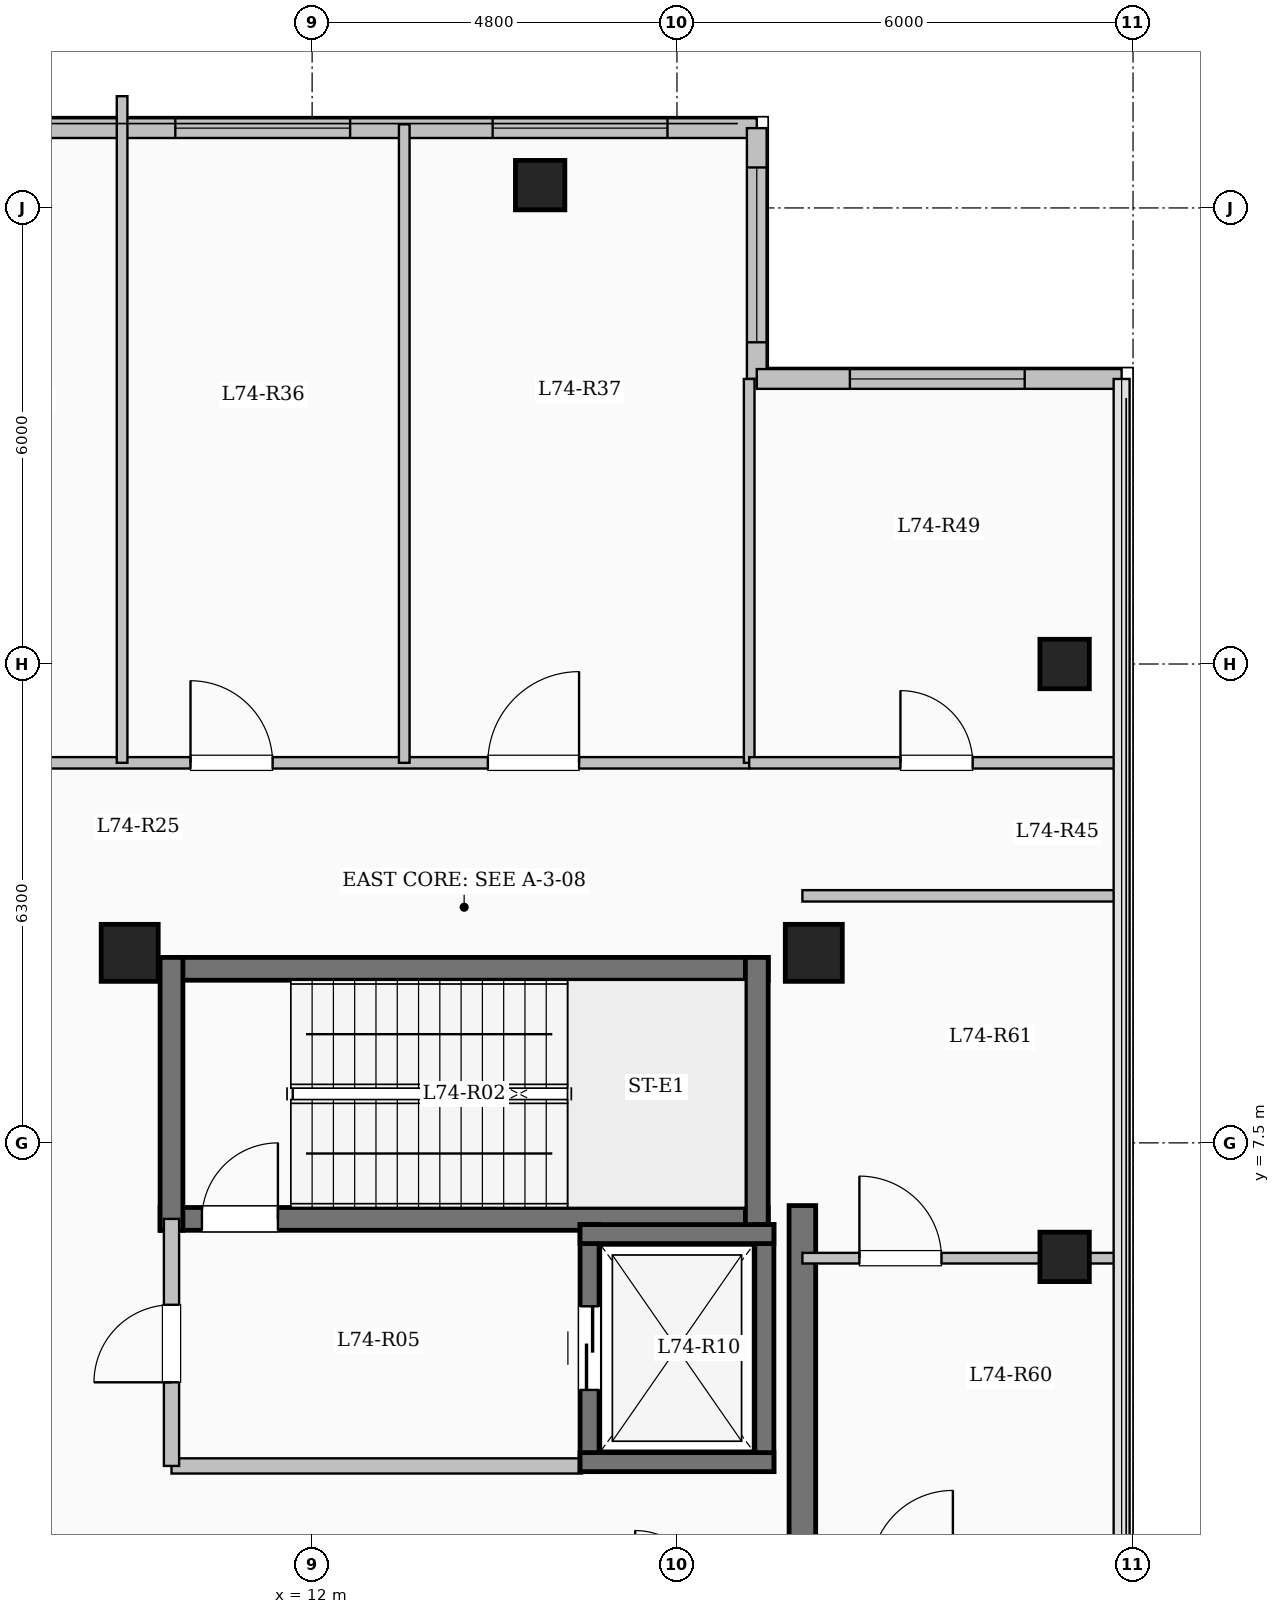
"""IFC4 building model, lengths in metres.
Left out: names, types, materials, properties, quantities, classifications, styles, units other than length and angle.
Written with IfcOpenShell. Run it as: python <this file> out.ifc"""

import sys

from ifc_helpers import new_model, si_unit, direction, frame, frame_2d, origin, origin_2d, place, context, subcontext, project, spatial, rectangle, extrude, element, fill, save


model = new_model("IFC4")
c1 = context("Model", 3, precision=1e-05, world=origin(), true_north=direction((0.0, 1.0)))
c2 = subcontext(c1, "Body", "Model", "MODEL_VIEW")
j1 = project(units=[si_unit("LENGTHUNIT", "METRE"), si_unit("PLANEANGLEUNIT", "RADIAN")], contexts=[c1])
p1 = place(None, origin())
s1 = spatial("IfcSite", under=j1, at=p1, CompositionType="ELEMENT")
p2 = place(p1, origin())
s2 = spatial("IfcBuilding", under=s1, at=p2, CompositionType="ELEMENT")
p3 = place(p2, frame((0.0, 0.0, 271.65)))
s3 = spatial("IfcBuildingStorey", under=s2, at=p3, CompositionType="ELEMENT", Elevation=271.65)
for number, where, z_axis, x_axis in (
    (1, (9.6, 10.0, 0.0), (0.0, 0.0, 1.0), (1.0, 0.0, 0.0)),
    (2, (18.6, 10.0, 0.0), (0.0, 0.0, 1.0), (1.0, 0.0, 0.0)),
):
    element("IfcColumn", number, at=place(p3, frame(where, z_axis=z_axis, x_axis=x_axis)), inside=s3, PredefinedType="COLUMN", context=c2, shape_type="SweptSolid", body=[
        extrude(rectangle(XDim=0.75, YDim=0.75, at=origin_2d()), origin(), (0.0, 0.0, 1.0), 4.65),
    ])
for number, where, z_axis, x_axis in (
    (3, (15.0, 20.1, 0.0), (0.0, 0.0, 1.0), (1.0, 0.0, 0.0)),
    (4, (21.9, 6.0, 0.0), (0.0, 0.0, 1.0), (1.0, 0.0, 0.0)),
    (5, (21.9, 13.8, 0.0), (0.0, 0.0, 1.0), (1.0, 0.0, 0.0)),
):
    element("IfcColumn", number, at=place(p3, frame(where, z_axis=z_axis, x_axis=x_axis)), inside=s3, PredefinedType="COLUMN", context=c2, shape_type="SweptSolid", body=[
        extrude(rectangle(XDim=0.65, YDim=0.65, at=origin_2d()), origin(), (0.0, 0.0, 1.0), 4.65),
    ])
p4 = place(p3, frame((7.35, 20.85, 0.0), z_axis=(0.0, 0.0, 1.0), x_axis=(1.0, 0.0, 0.0)))
e6 = element("IfcWall", 6, at=p4, inside=s3, PredefinedType="SOLIDWALL", context=c2, shape_type="SweptSolid", body=[
    extrude(rectangle(XDim=10.5, YDim=0.26, at=frame_2d((5.25, 0.0))), origin(), (0.0, 0.0, 1.0), 4.35),
])
p5 = place(p4, frame((2.85, 0.0, 0.85)))
e7 = element("IfcOpeningElement", 7, at=p5, cuts=e6, PredefinedType="OPENING", context=c2, shape_type="SweptSolid", body=[
    extrude(rectangle(XDim=2.3, YDim=2.2, at=frame_2d((1.15, 1.1))), frame((0.0, 0.14, 0.0), z_axis=(0.0, -1.0, 0.0), x_axis=(1.0, 0.0, 0.0)), (0.0, 0.0, 1.0), 0.28),
])
p6 = place(p4, frame((7.025, 0.0, 0.85)))
e8 = element("IfcOpeningElement", 8, at=p6, cuts=e6, PredefinedType="OPENING", context=c2, shape_type="SweptSolid", body=[
    extrude(rectangle(XDim=2.3, YDim=2.2, at=frame_2d((1.15, 1.1))), frame((0.0, 0.14, 0.0), z_axis=(0.0, -1.0, 0.0), x_axis=(1.0, 0.0, 0.0)), (0.0, 0.0, 1.0), 0.28),
])
p7 = place(p3, frame((17.85, 20.85, 0.0), z_axis=(0.0, 0.0, 1.0), x_axis=(0.0, -1.0, 0.0)))
e9 = element("IfcWall", 9, at=p7, inside=s3, PredefinedType="SOLIDWALL", context=c2, shape_type="SweptSolid", body=[
    extrude(rectangle(XDim=3.3, YDim=0.26, at=frame_2d((1.65, 0.0))), origin(), (0.0, 0.0, 1.0), 4.35),
])
p8 = place(p7, frame((0.518, 0.0, 0.85)))
e10 = element("IfcOpeningElement", 10, at=p8, cuts=e9, PredefinedType="OPENING", context=c2, shape_type="SweptSolid", body=[
    extrude(rectangle(XDim=2.3, YDim=2.2, at=frame_2d((1.15, 1.1))), frame((0.0, 0.14, 0.0), z_axis=(0.0, -1.0, 0.0), x_axis=(1.0, 0.0, 0.0)), (0.0, 0.0, 1.0), 0.28),
])
p9 = place(p3, frame((17.85, 17.55, 0.0), z_axis=(0.0, 0.0, 1.0), x_axis=(1.0, 0.0, 0.0)))
e11 = element("IfcWall", 11, at=p9, inside=s3, PredefinedType="SOLIDWALL", context=c2, shape_type="SweptSolid", body=[
    extrude(rectangle(XDim=4.8, YDim=0.26, at=frame_2d((2.4, 0.0))), origin(), (0.0, 0.0, 1.0), 4.35),
])
p10 = place(p9, frame((1.225, 0.0, 0.85)))
e12 = element("IfcOpeningElement", 12, at=p10, cuts=e11, PredefinedType="OPENING", context=c2, shape_type="SweptSolid", body=[
    extrude(rectangle(XDim=2.3, YDim=2.2, at=frame_2d((1.15, 1.1))), frame((0.0, 0.14, 0.0), z_axis=(0.0, -1.0, 0.0), x_axis=(1.0, 0.0, 0.0)), (0.0, 0.0, 1.0), 0.28),
])
p11 = place(p3, frame((10.0, 9.79, 0.0), z_axis=(0.0, 0.0, 1.0), x_axis=(1.0, 0.0, 0.0)))
e13 = element("IfcWall", 13, at=p11, inside=s3, PredefinedType="SHEAR", context=c2, shape_type="SweptSolid", body=[
    extrude(rectangle(XDim=8.0, YDim=0.3, at=frame_2d((4.0, 0.0))), origin(), (0.0, 0.0, 1.0), 4.65),
])
p12 = place(p3, frame((10.0, 6.5, 0.0), z_axis=(0.0, 0.0, 1.0), x_axis=(1.0, 0.0, 0.0)))
e14 = element("IfcWall", 14, at=p12, inside=s3, PredefinedType="SHEAR", context=c2, shape_type="SweptSolid", body=[
    extrude(rectangle(XDim=8.0, YDim=0.3, at=frame_2d((4.0, 0.0))), origin(), (0.0, 0.0, 1.0), 4.65),
])
p13 = place(p12, frame((0.55, 0.0, 0.0)))
e15 = element("IfcOpeningElement", 15, at=p13, cuts=e14, PredefinedType="OPENING", context=c2, shape_type="SweptSolid", body=[
    extrude(rectangle(XDim=1.0, YDim=2.15, at=frame_2d((0.5, 1.075))), frame((0.0, 0.16, 0.0), z_axis=(0.0, -1.0, 0.0), x_axis=(1.0, 0.0, 0.0)), (0.0, 0.0, 1.0), 0.32),
])
for number, where, z_axis, x_axis in (
    (16, (10.15, 6.35, 0.0), (0.0, 0.0, 1.0), (0.0, 1.0, 0.0)),
    (17, (17.85, 6.35, 0.0), (0.0, 0.0, 1.0), (0.0, 1.0, 0.0)),
):
    element("IfcWall", number, at=place(p3, frame(where, z_axis=z_axis, x_axis=x_axis)), inside=s3, PredefinedType="SHEAR", context=c2, shape_type="SweptSolid", body=[
        extrude(rectangle(XDim=3.59, YDim=0.3, at=frame_2d((1.795, 0.0))), origin(), (0.0, 0.0, 1.0), 4.65),
    ])
p14 = place(p3, frame((10.15, 3.25, 0.0), z_axis=(0.0, 0.0, 1.0), x_axis=(1.0, 0.0, 0.0)))
e18 = element("IfcWall", 18, at=p14, inside=s3, PredefinedType="SOLIDWALL", context=c2, shape_type="SweptSolid", body=[
    extrude(rectangle(XDim=5.4, YDim=0.2, at=frame_2d((2.7, 0.0))), origin(), (0.0, 0.0, 1.0), 4.35),
])
p15 = place(p3, frame((10.15, 3.25, 0.0), z_axis=(0.0, 0.0, 1.0), x_axis=(0.0, 1.0, 0.0)))
e19 = element("IfcWall", 19, at=p15, inside=s3, PredefinedType="SOLIDWALL", context=c2, shape_type="SweptSolid", body=[
    extrude(rectangle(XDim=3.25, YDim=0.2, at=frame_2d((1.625, 0.0))), origin(), (0.0, 0.0, 1.0), 4.35),
])
p16 = place(p15, frame((1.1, 0.0, 0.0)))
e20 = element("IfcOpeningElement", 20, at=p16, cuts=e19, PredefinedType="OPENING", context=c2, shape_type="SweptSolid", body=[
    extrude(rectangle(XDim=1.02, YDim=2.15, at=frame_2d((0.51, 1.075))), frame((0.0, 0.11, 0.0), z_axis=(0.0, -1.0, 0.0), x_axis=(1.0, 0.0, 0.0)), (0.0, 0.0, 1.0), 0.22),
])
p17 = place(p3, frame((15.65, 3.175, 0.0), z_axis=(0.0, 0.0, 1.0), x_axis=(0.0, 1.0, 0.0)))
e21 = element("IfcWall", 21, at=p17, inside=s3, PredefinedType="SHEAR", context=c2, shape_type="SweptSolid", body=[
    extrude(rectangle(XDim=3.25, YDim=0.25, at=frame_2d((1.625, 0.0))), origin(), (0.0, 0.0, 1.0), 4.65),
])
p18 = place(p17, frame((1.075, 0.0, 0.0)))
e22 = element("IfcOpeningElement", 22, at=p18, cuts=e21, PredefinedType="OPENING", context=c2, shape_type="SweptSolid", body=[
    extrude(rectangle(XDim=1.1, YDim=2.15, at=frame_2d((0.55, 1.075))), frame((0.0, 0.135, 0.0), z_axis=(0.0, -1.0, 0.0), x_axis=(1.0, 0.0, 0.0)), (0.0, 0.0, 1.0), 0.27),
])
p19 = place(p3, frame((17.95, 3.175, 0.0), z_axis=(0.0, 0.0, 1.0), x_axis=(0.0, 1.0, 0.0)))
e23 = element("IfcWall", 23, at=p19, inside=s3, PredefinedType="SHEAR", context=c2, shape_type="SweptSolid", body=[
    extrude(rectangle(XDim=3.25, YDim=0.25, at=frame_2d((1.625, 0.0))), origin(), (0.0, 0.0, 1.0), 4.65),
])
for number, where, z_axis, x_axis in (
    (24, (15.525, 3.3, 0.0), (0.0, 0.0, 1.0), (1.0, 0.0, 0.0)),
    (25, (15.525, 6.3, 0.0), (0.0, 0.0, 1.0), (1.0, 0.0, 0.0)),
):
    element("IfcWall", number, at=place(p3, frame(where, z_axis=z_axis, x_axis=x_axis)), inside=s3, PredefinedType="SHEAR", context=c2, shape_type="SweptSolid", body=[
        extrude(rectangle(XDim=2.55, YDim=0.25, at=frame_2d((1.275, 0.0))), origin(), (0.0, 0.0, 1.0), 4.65),
    ])
p20 = place(p3, frame((18.45, -7.375, 0.0), z_axis=(0.0, 0.0, 1.0), x_axis=(0.0, 1.0, 0.0)))
e26 = element("IfcWall", 26, at=p20, inside=s3, PredefinedType="SHEAR", context=c2, shape_type="SweptSolid", body=[
    extrude(rectangle(XDim=14.05, YDim=0.35, at=frame_2d((7.025, 0.0))), origin(), (0.0, 0.0, 1.0), 4.65),
])
p21 = place(p3, frame((3.85, 12.5, 0.0), z_axis=(0.0, 0.0, 1.0), x_axis=(1.0, 0.0, 0.0)))
e27 = element("IfcWall", 27, at=p21, inside=s3, PredefinedType="PARTITIONING", context=c2, shape_type="SweptSolid", body=[
    extrude(rectangle(XDim=13.9, YDim=0.15, at=frame_2d((6.95, 0.0))), origin(), (0.0, 0.0, 1.0), 4.35),
])
p22 = place(p21, frame((0.8, 0.0, 0.0)))
e28 = element("IfcOpeningElement", 28, at=p22, cuts=e27, PredefinedType="OPENING", context=c2, shape_type="SweptSolid", body=[
    extrude(rectangle(XDim=0.95, YDim=2.15, at=frame_2d((0.475, 1.075))), frame((0.0, 0.085, 0.0), z_axis=(0.0, -1.0, 0.0), x_axis=(1.0, 0.0, 0.0)), (0.0, 0.0, 1.0), 0.17),
])
p23 = place(p21, frame((3.6, 0.0, 0.0)))
e29 = element("IfcOpeningElement", 29, at=p23, cuts=e27, PredefinedType="OPENING", context=c2, shape_type="SweptSolid", body=[
    extrude(rectangle(XDim=0.95, YDim=2.15, at=frame_2d((0.475, 1.075))), frame((0.0, 0.085, 0.0), z_axis=(0.0, -1.0, 0.0), x_axis=(1.0, 0.0, 0.0)), (0.0, 0.0, 1.0), 0.17),
])
p24 = place(p21, frame((6.55, 0.0, 0.0)))
e30 = element("IfcOpeningElement", 30, at=p24, cuts=e27, PredefinedType="OPENING", context=c2, shape_type="SweptSolid", body=[
    extrude(rectangle(XDim=1.08, YDim=2.15, at=frame_2d((0.54, 1.075))), frame((0.0, 0.085, 0.0), z_axis=(0.0, -1.0, 0.0), x_axis=(1.0, 0.0, 0.0)), (0.0, 0.0, 1.0), 0.17),
])
p25 = place(p21, frame((10.462, 0.0, 0.0)))
e31 = element("IfcOpeningElement", 31, at=p25, cuts=e27, PredefinedType="OPENING", context=c2, shape_type="SweptSolid", body=[
    extrude(rectangle(XDim=1.2, YDim=2.15, at=frame_2d((0.6, 1.075))), frame((0.0, 0.085, 0.0), z_axis=(0.0, -1.0, 0.0), x_axis=(1.0, 0.0, 0.0)), (0.0, 0.0, 1.0), 0.17),
])
p26 = place(p3, frame((9.5, 12.5, 0.0), z_axis=(0.0, 0.0, 1.0), x_axis=(0.0, 1.0, 0.0)))
e32 = element("IfcWall", 32, at=p26, inside=s3, PredefinedType="PARTITIONING", context=c2, shape_type="SweptSolid", body=[
    extrude(rectangle(XDim=8.77, YDim=0.14, at=frame_2d((4.385, 0.0))), origin(), (0.0, 0.0, 1.0), 4.35),
])
p27 = place(p3, frame((13.212, 12.5, 0.0), z_axis=(0.0, 0.0, 1.0), x_axis=(0.0, 1.0, 0.0)))
e33 = element("IfcWall", 33, at=p27, inside=s3, PredefinedType="PARTITIONING", context=c2, shape_type="SweptSolid", body=[
    extrude(rectangle(XDim=8.4, YDim=0.14, at=frame_2d((4.2, 0.0))), origin(), (0.0, 0.0, 1.0), 4.35),
])
p28 = place(p3, frame((18.45, 10.75, 0.0), z_axis=(0.0, 0.0, 1.0), x_axis=(1.0, 0.0, 0.0)))
e34 = element("IfcWall", 34, at=p28, inside=s3, PredefinedType="PARTITIONING", context=c2, shape_type="SweptSolid", body=[
    extrude(rectangle(XDim=4.23, YDim=0.15, at=frame_2d((2.115, 0.0))), origin(), (0.0, 0.0, 1.0), 4.35),
])
p29 = place(p3, frame((17.75, 12.5, 0.0), z_axis=(0.0, 0.0, 1.0), x_axis=(0.0, 1.0, 0.0)))
e35 = element("IfcWall", 35, at=p29, inside=s3, PredefinedType="PARTITIONING", context=c2, shape_type="SweptSolid", body=[
    extrude(rectangle(XDim=5.05, YDim=0.14, at=frame_2d((2.525, 0.0))), origin(), (0.0, 0.0, 1.0), 4.35),
])
p30 = place(p3, frame((17.75, 12.5, 0.0), z_axis=(0.0, 0.0, 1.0), x_axis=(1.0, 0.0, 0.0)))
e36 = element("IfcWall", 36, at=p30, inside=s3, PredefinedType="PARTITIONING", context=c2, shape_type="SweptSolid", body=[
    extrude(rectangle(XDim=4.93, YDim=0.15, at=frame_2d((2.465, 0.0))), origin(), (0.0, 0.0, 1.0), 4.35),
])
p31 = place(p30, frame((1.99, 0.0, 0.0)))
e37 = element("IfcOpeningElement", 37, at=p31, cuts=e36, PredefinedType="OPENING", context=c2, shape_type="SweptSolid", body=[
    extrude(rectangle(XDim=0.95, YDim=2.15, at=frame_2d((0.475, 1.075))), frame((0.0, 0.085, 0.0), z_axis=(0.0, -1.0, 0.0), x_axis=(1.0, 0.0, 0.0)), (0.0, 0.0, 1.0), 0.17),
])
p32 = place(p3, frame((18.45, 5.983, 0.0), z_axis=(0.0, 0.0, 1.0), x_axis=(1.0, 0.0, 0.0)))
e38 = element("IfcWall", 38, at=p32, inside=s3, PredefinedType="PARTITIONING", context=c2, shape_type="SweptSolid", body=[
    extrude(rectangle(XDim=4.23, YDim=0.14, at=frame_2d((2.115, 0.0))), origin(), (0.0, 0.0, 1.0), 3.935),
])
p33 = place(p32, frame((0.75, 0.0, 0.0)))
e39 = element("IfcOpeningElement", 39, at=p33, cuts=e38, PredefinedType="OPENING", context=c2, shape_type="SweptSolid", body=[
    extrude(rectangle(XDim=1.08, YDim=2.15, at=frame_2d((0.54, 1.075))), frame((0.0, 0.08, 0.0), z_axis=(0.0, -1.0, 0.0), x_axis=(1.0, 0.0, 0.0)), (0.0, 0.0, 1.0), 0.16),
])
p34 = place(p5, origin())
e40 = element("IfcWindow", 40, at=p34, inside=s3, PartitioningType="SINGLE_PANEL", PredefinedType="WINDOW", context=c2, shape_type="SweptSolid", body=[
    extrude(rectangle(XDim=2.3, YDim=2.2, at=frame_2d((1.15, 1.1))), frame((0.0, 0.03, 0.0), z_axis=(0.0, -1.0, 0.0), x_axis=(1.0, 0.0, 0.0)), (0.0, 0.0, 1.0), 0.06),
])
fill(e7, e40)
p35 = place(p6, origin())
e41 = element("IfcWindow", 41, at=p35, inside=s3, PartitioningType="SINGLE_PANEL", PredefinedType="WINDOW", context=c2, shape_type="SweptSolid", body=[
    extrude(rectangle(XDim=2.3, YDim=2.2, at=frame_2d((1.15, 1.1))), frame((0.0, 0.03, 0.0), z_axis=(0.0, -1.0, 0.0), x_axis=(1.0, 0.0, 0.0)), (0.0, 0.0, 1.0), 0.06),
])
fill(e8, e41)
p36 = place(p8, origin())
e42 = element("IfcWindow", 42, at=p36, inside=s3, PartitioningType="SINGLE_PANEL", PredefinedType="WINDOW", context=c2, shape_type="SweptSolid", body=[
    extrude(rectangle(XDim=2.3, YDim=2.2, at=frame_2d((1.15, 1.1))), frame((0.0, 0.03, 0.0), z_axis=(0.0, -1.0, 0.0), x_axis=(1.0, 0.0, 0.0)), (0.0, 0.0, 1.0), 0.06),
])
fill(e10, e42)
p37 = place(p10, origin())
e43 = element("IfcWindow", 43, at=p37, inside=s3, PartitioningType="SINGLE_PANEL", PredefinedType="WINDOW", context=c2, shape_type="SweptSolid", body=[
    extrude(rectangle(XDim=2.3, YDim=2.2, at=frame_2d((1.15, 1.1))), frame((0.0, 0.03, 0.0), z_axis=(0.0, -1.0, 0.0), x_axis=(1.0, 0.0, 0.0)), (0.0, 0.0, 1.0), 0.06),
])
fill(e12, e43)
p38 = place(p13, origin())
e44 = element("IfcDoor", 44, at=p38, inside=s3, OperationType="SINGLE_SWING_RIGHT", PredefinedType="DOOR", context=c2, shape_type="SweptSolid", body=[
    extrude(rectangle(XDim=1.0, YDim=2.15, at=frame_2d((0.5, 1.075))), frame((0.0, 0.025, 0.0), z_axis=(0.0, -1.0, 0.0), x_axis=(1.0, 0.0, 0.0)), (0.0, 0.0, 1.0), 0.05),
])
fill(e15, e44)
p39 = place(p16, origin())
e45 = element("IfcDoor", 45, at=p39, inside=s3, OperationType="SINGLE_SWING_LEFT", PredefinedType="DOOR", context=c2, shape_type="SweptSolid", body=[
    extrude(rectangle(XDim=1.02, YDim=2.15, at=frame_2d((0.51, 1.075))), frame((0.0, 0.025, 0.0), z_axis=(0.0, -1.0, 0.0), x_axis=(1.0, 0.0, 0.0)), (0.0, 0.0, 1.0), 0.05),
])
fill(e20, e45)
p40 = place(p18, origin())
e46 = element("IfcDoor", 46, at=p40, inside=s3, OperationType="SLIDING_TO_LEFT", PredefinedType="DOOR", context=c2, shape_type="SweptSolid", body=[
    extrude(rectangle(XDim=1.1, YDim=2.15, at=frame_2d((0.55, 1.075))), frame((0.0, 0.025, 0.0), z_axis=(0.0, -1.0, 0.0), x_axis=(1.0, 0.0, 0.0)), (0.0, 0.0, 1.0), 0.05),
])
fill(e22, e46)
p41 = place(p24, origin())
e47 = element("IfcDoor", 47, at=p41, inside=s3, OperationType="SINGLE_SWING_LEFT", PredefinedType="DOOR", context=c2, shape_type="SweptSolid", body=[
    extrude(rectangle(XDim=1.08, YDim=2.15, at=frame_2d((0.54, 1.075))), frame((0.0, 0.025, 0.0), z_axis=(0.0, -1.0, 0.0), x_axis=(1.0, 0.0, 0.0)), (0.0, 0.0, 1.0), 0.05),
])
fill(e30, e47)
p42 = place(p25, origin())
e48 = element("IfcDoor", 48, at=p42, inside=s3, OperationType="SINGLE_SWING_RIGHT", PredefinedType="DOOR", context=c2, shape_type="SweptSolid", body=[
    extrude(rectangle(XDim=1.2, YDim=2.15, at=frame_2d((0.6, 1.075))), frame((0.0, 0.025, 0.0), z_axis=(0.0, -1.0, 0.0), x_axis=(1.0, 0.0, 0.0)), (0.0, 0.0, 1.0), 0.05),
])
fill(e31, e48)
p43 = place(p31, origin())
e49 = element("IfcDoor", 49, at=p43, inside=s3, OperationType="SINGLE_SWING_LEFT", PredefinedType="DOOR", context=c2, shape_type="SweptSolid", body=[
    extrude(rectangle(XDim=0.95, YDim=2.15, at=frame_2d((0.475, 1.075))), frame((0.0, 0.025, 0.0), z_axis=(0.0, -1.0, 0.0), x_axis=(1.0, 0.0, 0.0)), (0.0, 0.0, 1.0), 0.05),
])
fill(e37, e49)
p44 = place(p33, origin())
e50 = element("IfcDoor", 50, at=p44, inside=s3, OperationType="SINGLE_SWING_LEFT", PredefinedType="DOOR", context=c2, shape_type="SweptSolid", body=[
    extrude(rectangle(XDim=1.08, YDim=2.15, at=frame_2d((0.54, 1.075))), frame((0.0, 0.025, 0.0), z_axis=(0.0, -1.0, 0.0), x_axis=(1.0, 0.0, 0.0)), (0.0, 0.0, 1.0), 0.05),
])
fill(e39, e50)
save(model, sys.argv[1])
